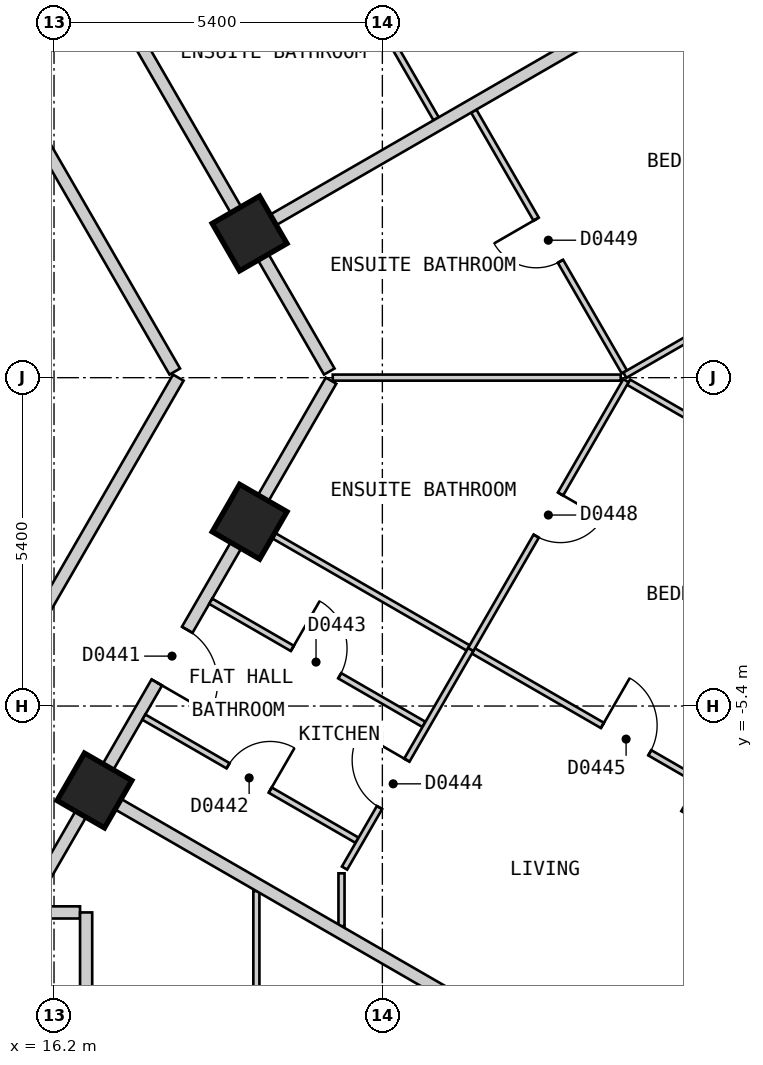
"""IFC4 building model, lengths in metres.
Left out: names, types, materials, properties, quantities, classifications, styles, units other than length and angle.
Written with IfcOpenShell. Run it as: python <this file> out.ifc"""

import sys

from ifc_helpers import new_model, si_unit, direction, frame, frame_2d, origin, origin_2d, place, context, subcontext, project, spatial, polyline, rectangle, outline, extrude, element, fill, save


model = new_model("IFC4")
c1 = context("Model", 3, precision=1e-05, world=origin(), true_north=direction((0.0, 1.0)))
c2 = subcontext(c1, "Body", "Model", "MODEL_VIEW")
j1 = project(units=[si_unit("LENGTHUNIT", "METRE"), si_unit("PLANEANGLEUNIT", "RADIAN")], contexts=[c1])
p1 = place(None, origin())
s1 = spatial("IfcSite", under=j1, at=p1, CompositionType="ELEMENT")
p2 = place(p1, origin())
s2 = spatial("IfcBuilding", under=s1, at=p2, CompositionType="ELEMENT")
p3 = place(p2, frame((0.0, 0.0, 32.4)))
s3 = spatial("IfcBuildingStorey", under=s2, at=p3, CompositionType="ELEMENT", Elevation=32.4)
p4 = place(p3, frame((27.298, -6.919, 0.0), z_axis=(0.0, 0.0, 1.0), x_axis=(0.499984884929, 0.866034130299, 0.0)))
e1 = element("IfcColumn", 1, at=p4, inside=s3, PredefinedType="COLUMN", context=c2, shape_type="SweptSolid", body=[
    extrude(rectangle(XDim=1.1, YDim=1.1, at=origin_2d()), origin(), (0.0, 0.0, 1.0), 3.0),
])
for number, where, z_axis, x_axis in (
    (2, (16.865, -6.789, 0.0), (0.0, 0.0, 1.0), (0.5, 0.866, 0.0)),
    (3, (19.417, -2.369, 0.0), (0.0, 0.0, 1.0), (0.5, 0.866, 0.0)),
    (4, (19.416, 2.371, 0.0), (0.0, 0.0, 1.0), (-0.5, 0.866, 0.0)),
):
    element("IfcColumn", number, at=place(p3, frame(where, z_axis=z_axis, x_axis=x_axis)), inside=s3, PredefinedType="COLUMN", context=c2, shape_type="SweptSolid", body=[
        extrude(rectangle(XDim=0.9, YDim=0.9, at=origin_2d()), origin(), (0.0, 0.0, 1.0), 3.0),
    ])
p5 = place(p3, frame((17.71, -25.825, 0.0), z_axis=(0.0, 0.0, 1.0), x_axis=(0.500001938803, 0.866024284413, 0.0)))
e5 = element("IfcWall", 5, at=p5, inside=s3, PredefinedType="SOLIDWALL", context=c2, shape_type="SweptSolid", body=[
    extrude(outline(polyline([(0.0, -0.15), (27.02, -0.15), (26.94, 0.15), (0.08, 0.15), (0.0, -0.15)])), origin(), (0.0, 0.0, 1.0), 2.7),
])
p6 = place(p5, frame((2.553, 0.0, 0.15)))
e6 = element("IfcOpeningElement", 6, at=p6, cuts=e5, PredefinedType="OPENING", context=c2, shape_type="SweptSolid", body=[
    extrude(rectangle(XDim=1.5, YDim=2.1, at=frame_2d((0.75, 1.05))), frame((0.0, 0.16, 0.0), z_axis=(0.0, -1.0, 0.0), x_axis=(1.0, 0.0, 0.0)), (0.0, 0.0, 1.0), 0.32),
])
p7 = place(p5, frame((7.658, 0.0, 0.15)))
e7 = element("IfcOpeningElement", 7, at=p7, cuts=e5, PredefinedType="OPENING", context=c2, shape_type="SweptSolid", body=[
    extrude(rectangle(XDim=1.5, YDim=2.1, at=frame_2d((0.75, 1.05))), frame((0.0, 0.16, 0.0), z_axis=(0.0, -1.0, 0.0), x_axis=(1.0, 0.0, 0.0)), (0.0, 0.0, 1.0), 0.32),
])
p8 = place(p5, frame((12.761, 0.0, 0.15)))
e8 = element("IfcOpeningElement", 8, at=p8, cuts=e5, PredefinedType="OPENING", context=c2, shape_type="SweptSolid", body=[
    extrude(rectangle(XDim=1.5, YDim=2.1, at=frame_2d((0.75, 1.05))), frame((0.0, 0.16, 0.0), z_axis=(0.0, -1.0, 0.0), x_axis=(1.0, 0.0, 0.0)), (0.0, 0.0, 1.0), 0.32),
])
p9 = place(p5, frame((17.865, 0.0, 0.15)))
e9 = element("IfcOpeningElement", 9, at=p9, cuts=e5, PredefinedType="OPENING", context=c2, shape_type="SweptSolid", body=[
    extrude(rectangle(XDim=1.5, YDim=2.1, at=frame_2d((0.75, 1.05))), frame((0.0, 0.16, 0.0), z_axis=(0.0, -1.0, 0.0), x_axis=(1.0, 0.0, 0.0)), (0.0, 0.0, 1.0), 0.32),
])
p10 = place(p5, frame((22.969, 0.0, 0.15)))
e10 = element("IfcOpeningElement", 10, at=p10, cuts=e5, PredefinedType="OPENING", context=c2, shape_type="SweptSolid", body=[
    extrude(rectangle(XDim=1.5, YDim=2.1, at=frame_2d((0.75, 1.05))), frame((0.0, 0.16, 0.0), z_axis=(0.0, -1.0, 0.0), x_axis=(1.0, 0.0, 0.0)), (0.0, 0.0, 1.0), 0.32),
])
p11 = place(p3, frame((31.22, 2.425, 0.0), z_axis=(0.0, 0.0, 1.0), x_axis=(-0.500001938803, 0.866024284413, 0.0)))
e11 = element("IfcWall", 11, at=p11, inside=s3, PredefinedType="SOLIDWALL", context=c2, shape_type="SweptSolid", body=[
    extrude(outline(polyline([(0.0, -0.15), (27.02, -0.15), (26.94, 0.15), (0.08, 0.15), (0.0, -0.15)])), origin(), (0.0, 0.0, 1.0), 2.7),
])
p12 = place(p11, frame((2.553, 0.0, 0.15)))
e12 = element("IfcOpeningElement", 12, at=p12, cuts=e11, PredefinedType="OPENING", context=c2, shape_type="SweptSolid", body=[
    extrude(rectangle(XDim=1.5, YDim=2.1, at=frame_2d((0.75, 1.05))), frame((0.0, 0.16, 0.0), z_axis=(0.0, -1.0, 0.0), x_axis=(1.0, 0.0, 0.0)), (0.0, 0.0, 1.0), 0.32),
])
p13 = place(p11, frame((7.657, 0.0, 0.15)))
e13 = element("IfcOpeningElement", 13, at=p13, cuts=e11, PredefinedType="OPENING", context=c2, shape_type="SweptSolid", body=[
    extrude(rectangle(XDim=1.5, YDim=2.1, at=frame_2d((0.75, 1.05))), frame((0.0, 0.16, 0.0), z_axis=(0.0, -1.0, 0.0), x_axis=(1.0, 0.0, 0.0)), (0.0, 0.0, 1.0), 0.32),
])
p14 = place(p11, frame((12.761, 0.0, 0.15)))
e14 = element("IfcOpeningElement", 14, at=p14, cuts=e11, PredefinedType="OPENING", context=c2, shape_type="SweptSolid", body=[
    extrude(rectangle(XDim=1.5, YDim=2.1, at=frame_2d((0.75, 1.05))), frame((0.0, 0.16, 0.0), z_axis=(0.0, -1.0, 0.0), x_axis=(1.0, 0.0, 0.0)), (0.0, 0.0, 1.0), 0.32),
])
p15 = place(p11, frame((17.865, 0.0, 0.15)))
e15 = element("IfcOpeningElement", 15, at=p15, cuts=e11, PredefinedType="OPENING", context=c2, shape_type="SweptSolid", body=[
    extrude(rectangle(XDim=1.5, YDim=2.1, at=frame_2d((0.75, 1.05))), frame((0.0, 0.16, 0.0), z_axis=(0.0, -1.0, 0.0), x_axis=(1.0, 0.0, 0.0)), (0.0, 0.0, 1.0), 0.32),
])
p16 = place(p11, frame((22.969, 0.0, 0.15)))
e16 = element("IfcOpeningElement", 16, at=p16, cuts=e11, PredefinedType="OPENING", context=c2, shape_type="SweptSolid", body=[
    extrude(rectangle(XDim=1.5, YDim=2.1, at=frame_2d((0.75, 1.05))), frame((0.0, 0.16, 0.0), z_axis=(0.0, -1.0, 0.0), x_axis=(1.0, 0.0, 0.0)), (0.0, 0.0, 1.0), 0.32),
])
p17 = place(p3, frame((9.18, 15.7, 0.0), z_axis=(0.0, 0.0, 1.0), x_axis=(0.500003652032, -0.866023295272, 0.0)))
e17 = element("IfcWall", 17, at=p17, inside=s3, PredefinedType="PARTITIONING", context=c2, shape_type="SweptSolid", body=[
    extrude(rectangle(XDim=18.012, YDim=0.2, at=frame_2d((9.006, 0.0))), origin(), (0.0, 0.0, 1.0), 2.7),
])
p18 = place(p17, frame((8.556, 0.0, 0.0)))
e18 = element("IfcOpeningElement", 18, at=p18, cuts=e17, PredefinedType="OPENING", context=c2, shape_type="SweptSolid", body=[
    extrude(rectangle(XDim=0.9, YDim=2.1, at=frame_2d((0.45, 1.05))), frame((0.0, 0.11, 0.0), z_axis=(0.0, -1.0, 0.0), x_axis=(1.0, 0.0, 0.0)), (0.0, 0.0, 1.0), 0.22),
])
p19 = place(p3, frame((10.45, 17.9, 0.0), z_axis=(0.0, 0.0, 1.0), x_axis=(0.500034352617, -0.866005569383, 0.0)))
e19 = element("IfcWall", 19, at=p19, inside=s3, PredefinedType="PARTITIONING", context=c2, shape_type="SweptSolid", body=[
    extrude(rectangle(XDim=20.553, YDim=0.2, at=frame_2d((10.276, 0.0))), origin(), (0.0, 0.0, 1.0), 2.7),
])
p20 = place(p19, frame((9.775, 0.0, 0.0)))
e20 = element("IfcOpeningElement", 20, at=p20, cuts=e19, PredefinedType="OPENING", context=c2, shape_type="SweptSolid", body=[
    extrude(rectangle(XDim=1.0, YDim=2.1, at=frame_2d((0.5, 1.05))), frame((0.0, 0.11, 0.0), z_axis=(0.0, -1.0, 0.0), x_axis=(1.0, 0.0, 0.0)), (0.0, 0.0, 1.0), 0.22),
])
p21 = place(p19, frame((0.852, 0.0, 0.0)))
e21 = element("IfcOpeningElement", 21, at=p21, cuts=e19, PredefinedType="OPENING", context=c2, shape_type="SweptSolid", body=[
    extrude(rectangle(XDim=0.8, YDim=2.1, at=frame_2d((0.4, 1.05))), frame((0.0, 0.11, 0.0), z_axis=(0.0, -1.0, 0.0), x_axis=(1.0, 0.0, 0.0)), (0.0, 0.0, 1.0), 0.22),
])
p22 = place(p3, frame((15.822, -8.794, 0.0), z_axis=(0.0, 0.0, 1.0), x_axis=(1.0, 0.0, 0.0)))
e22 = element("IfcWall", 22, at=p22, inside=s3, PredefinedType="PARTITIONING", context=c2, shape_type="SweptSolid", body=[
    extrude(rectangle(XDim=0.806, YDim=0.2, at=frame_2d((0.403, 0.0))), origin(), (0.0, 0.0, 1.0), 2.7),
])
p23 = place(p3, frame((15.6, -4.579, 0.0), z_axis=(0.0, 0.0, 1.0), x_axis=(0.499927597274, 0.866067201483, 0.0)))
e23 = element("IfcWall", 23, at=p23, inside=s3, PredefinedType="PARTITIONING", context=c2, shape_type="SweptSolid", body=[
    extrude(rectangle(XDim=5.288, YDim=0.2, at=frame_2d((2.644, 0.0))), origin(), (0.0, 0.0, 1.0), 2.7),
])
p24 = place(p3, frame((15.707, -8.794, 0.0), z_axis=(0.0, 0.0, 1.0), x_axis=(0.500016151272, 0.866016078642, 0.0)))
e24 = element("IfcWall", 24, at=p24, inside=s3, PredefinedType="PARTITIONING", context=c2, shape_type="SweptSolid", body=[
    extrude(rectangle(XDim=10.098, YDim=0.2, at=frame_2d((5.049, 0.0))), origin(), (0.0, 0.0, 1.0), 2.7),
])
p25 = place(p24, frame((4.367, 0.0, 0.0)))
e25 = element("IfcOpeningElement", 25, at=p25, cuts=e24, PredefinedType="OPENING", context=c2, shape_type="SweptSolid", body=[
    extrude(rectangle(XDim=1.0, YDim=2.1, at=frame_2d((0.5, 1.05))), frame((0.0, 0.11, 0.0), z_axis=(0.0, -1.0, 0.0), x_axis=(1.0, 0.0, 0.0)), (0.0, 0.0, 1.0), 0.22),
])
p26 = place(p3, frame((16.728, -13.624, 0.0), z_axis=(0.0, 0.0, 1.0), x_axis=(0.0, 1.0, 0.0)))
e26 = element("IfcWall", 26, at=p26, inside=s3, PredefinedType="PARTITIONING", context=c2, shape_type="SweptSolid", body=[
    extrude(rectangle(XDim=4.83, YDim=0.2, at=frame_2d((2.415, 0.0))), origin(), (0.0, 0.0, 1.0), 2.7),
])
p27 = place(p3, frame((20.006, 8.548, 0.0), z_axis=(0.0, 0.0, 1.0), x_axis=(0.500055121407, -0.865993577086, 0.0)))
e27 = element("IfcWall", 27, at=p27, inside=s3, PredefinedType="PARTITIONING", context=c2, shape_type="SweptSolid", body=[
    extrude(rectangle(XDim=4.955, YDim=0.1, at=frame_2d((2.478, 0.0))), origin(), (0.0, 0.0, 1.0), 2.7),
])
p28 = place(p27, frame((2.102, 0.0, 0.0)))
e28 = element("IfcOpeningElement", 28, at=p28, cuts=e27, PredefinedType="OPENING", context=c2, shape_type="SweptSolid", body=[
    extrude(rectangle(XDim=0.8, YDim=2.1, at=frame_2d((0.4, 1.05))), frame((0.0, 0.06, 0.0), z_axis=(0.0, -1.0, 0.0), x_axis=(1.0, 0.0, 0.0)), (0.0, 0.0, 1.0), 0.12),
])
p29 = place(p3, frame((23.103, 4.384, 0.0), z_axis=(0.0, 0.0, 1.0), x_axis=(0.500029609304, -0.86600830817, 0.0)))
e29 = element("IfcWall", 29, at=p29, inside=s3, PredefinedType="PARTITIONING", context=c2, shape_type="SweptSolid", body=[
    extrude(rectangle(XDim=4.954, YDim=0.1, at=frame_2d((2.477, 0.0))), origin(), (0.0, 0.0, 1.0), 2.7),
])
p30 = place(p29, frame((2.052, 0.0, 0.0)))
e30 = element("IfcOpeningElement", 30, at=p30, cuts=e29, PredefinedType="OPENING", context=c2, shape_type="SweptSolid", body=[
    extrude(rectangle(XDim=0.8, YDim=2.1, at=frame_2d((0.4, 1.05))), frame((0.0, 0.06, 0.0), z_axis=(0.0, -1.0, 0.0), x_axis=(1.0, 0.0, 0.0)), (0.0, 0.0, 1.0), 0.12),
])
p31 = place(p3, frame((17.677, -5.582, 0.0), z_axis=(0.0, 0.0, 1.0), x_axis=(0.866015917575, -0.500016430238, 0.0)))
e31 = element("IfcWall", 31, at=p31, inside=s3, PredefinedType="PARTITIONING", context=c2, shape_type="SweptSolid", body=[
    extrude(rectangle(XDim=4.05, YDim=0.1, at=frame_2d((2.025, 0.0))), origin(), (0.0, 0.0, 1.0), 2.7),
])
p32 = place(p31, frame((1.6, 0.0, 0.0)))
e32 = element("IfcOpeningElement", 32, at=p32, cuts=e31, PredefinedType="OPENING", context=c2, shape_type="SweptSolid", body=[
    extrude(rectangle(XDim=0.8, YDim=2.1, at=frame_2d((0.4, 1.05))), frame((0.0, 0.06, 0.0), z_axis=(0.0, -1.0, 0.0), x_axis=(1.0, 0.0, 0.0)), (0.0, 0.0, 1.0), 0.12),
])
p33 = place(p3, frame((18.777, -3.677, 0.0), z_axis=(0.0, 0.0, 1.0), x_axis=(0.866000843773, -0.500042536776, 0.0)))
e33 = element("IfcWall", 33, at=p33, inside=s3, PredefinedType="PARTITIONING", context=c2, shape_type="SweptSolid", body=[
    extrude(rectangle(XDim=4.05, YDim=0.1, at=frame_2d((2.025, 0.0))), origin(), (0.0, 0.0, 1.0), 2.7),
])
p34 = place(p33, frame((1.55, 0.0, 0.0)))
e34 = element("IfcOpeningElement", 34, at=p34, cuts=e33, PredefinedType="OPENING", context=c2, shape_type="SweptSolid", body=[
    extrude(rectangle(XDim=0.9, YDim=2.1, at=frame_2d((0.45, 1.05))), frame((0.0, 0.06, 0.0), z_axis=(0.0, -1.0, 0.0), x_axis=(1.0, 0.0, 0.0)), (0.0, 0.0, 1.0), 0.12),
])
p35 = place(p3, frame((19.503, -2.419, 0.0), z_axis=(0.0, 0.0, 1.0), x_axis=(0.866047370643, -0.499961950354, 0.0)))
e35 = element("IfcWall", 35, at=p35, inside=s3, PredefinedType="PARTITIONING", context=c2, shape_type="SweptSolid", body=[
    extrude(rectangle(XDim=10.001, YDim=0.1, at=frame_2d((5.0, 0.0))), origin(), (0.0, 0.0, 1.0), 2.7),
])
p36 = place(p35, frame((6.6, 0.0, 0.0)))
e36 = element("IfcOpeningElement", 36, at=p36, cuts=e35, PredefinedType="OPENING", context=c2, shape_type="SweptSolid", body=[
    extrude(rectangle(XDim=0.9, YDim=2.1, at=frame_2d((0.45, 1.05))), frame((0.0, 0.06, 0.0), z_axis=(0.0, -1.0, 0.0), x_axis=(1.0, 0.0, 0.0)), (0.0, 0.0, 1.0), 0.12),
])
p37 = place(p3, frame((25.649, -0.074, 0.0), z_axis=(0.0, 0.0, 1.0), x_axis=(0.866059819573, -0.499940385368, 0.0)))
e37 = element("IfcWall", 37, at=p37, inside=s3, PredefinedType="PARTITIONING", context=c2, shape_type="SweptSolid", body=[
    extrude(rectangle(XDim=5.851, YDim=0.1, at=frame_2d((2.925, 0.0))), origin(), (0.0, 0.0, 1.0), 2.7),
])
p38 = place(p37, frame((2.45, 0.0, 0.0)))
e38 = element("IfcOpeningElement", 38, at=p38, cuts=e37, PredefinedType="OPENING", context=c2, shape_type="SweptSolid", body=[
    extrude(rectangle(XDim=0.9, YDim=2.1, at=frame_2d((0.45, 1.05))), frame((0.0, 0.06, 0.0), z_axis=(0.0, -1.0, 0.0), x_axis=(1.0, 0.0, 0.0)), (0.0, 0.0, 1.0), 0.12),
])
p39 = place(p3, frame((20.784, 0.001, 0.0), z_axis=(0.0, 0.0, 1.0), x_axis=(1.0, 0.0, 0.0)))
e39 = element("IfcWall", 39, at=p39, inside=s3, PredefinedType="PARTITIONING", context=c2, shape_type="SweptSolid", body=[
    extrude(rectangle(XDim=4.736, YDim=0.1, at=frame_2d((2.368, 0.0))), origin(), (0.0, 0.0, 1.0), 2.7),
])
p40 = place(p3, frame((20.978, -8.065, 0.0), z_axis=(0.0, 0.0, 1.0), x_axis=(0.499965068118, 0.866045570776, 0.0)))
e40 = element("IfcWall", 40, at=p40, inside=s3, PredefinedType="PARTITIONING", context=c2, shape_type="SweptSolid", body=[
    extrude(rectangle(XDim=4.152, YDim=0.1, at=frame_2d((2.076, 0.0))), origin(), (0.0, 0.0, 1.0), 2.7),
])
p41 = place(p40, frame((1.15, 0.0, 0.0)))
e41 = element("IfcOpeningElement", 41, at=p41, cuts=e40, PredefinedType="OPENING", context=c2, shape_type="SweptSolid", body=[
    extrude(rectangle(XDim=0.9, YDim=2.1, at=frame_2d((0.45, 1.05))), frame((0.0, 0.06, 0.0), z_axis=(0.0, -1.0, 0.0), x_axis=(1.0, 0.0, 0.0)), (0.0, 0.0, 1.0), 0.12),
])
p42 = place(p3, frame((19.528, -16.424, 0.0), z_axis=(0.0, 0.0, 1.0), x_axis=(0.0, 1.0, 0.0)))
e42 = element("IfcWall", 42, at=p42, inside=s3, PredefinedType="PARTITIONING", context=c2, shape_type="SweptSolid", body=[
    extrude(rectangle(XDim=7.982, YDim=0.1, at=frame_2d((3.991, 0.0))), origin(), (0.0, 0.0, 1.0), 2.7),
])
p43 = place(p42, frame((4.75, 0.0, 0.0)))
e43 = element("IfcOpeningElement", 43, at=p43, cuts=e42, PredefinedType="OPENING", context=c2, shape_type="SweptSolid", body=[
    extrude(rectangle(XDim=0.8, YDim=2.1, at=frame_2d((0.4, 1.05))), frame((0.0, 0.06, 0.0), z_axis=(0.0, -1.0, 0.0), x_axis=(1.0, 0.0, 0.0)), (0.0, 0.0, 1.0), 0.12),
])
p44 = place(p3, frame((20.928, -9.02, 0.0), z_axis=(0.0, 0.0, 1.0), x_axis=(0.0, 1.0, 0.0)))
e44 = element("IfcWall", 44, at=p44, inside=s3, PredefinedType="PARTITIONING", context=c2, shape_type="SweptSolid", body=[
    extrude(rectangle(XDim=0.869, YDim=0.1, at=frame_2d((0.435, 0.0))), origin(), (0.0, 0.0, 1.0), 2.7),
])
p45 = place(p3, frame((25.588, 0.041, 0.0), z_axis=(0.0, 0.0, 1.0), x_axis=(0.866113484451, 0.499847408768, 0.0)))
e45 = element("IfcWall", 45, at=p45, inside=s3, PredefinedType="PARTITIONING", context=c2, shape_type="SweptSolid", body=[
    extrude(rectangle(XDim=5.92, YDim=0.1, at=frame_2d((2.96, 0.0))), origin(), (0.0, 0.0, 1.0), 2.7),
])
p46 = place(p45, frame((2.51, 0.0, 0.0)))
e46 = element("IfcOpeningElement", 46, at=p46, cuts=e45, PredefinedType="OPENING", context=c2, shape_type="SweptSolid", body=[
    extrude(rectangle(XDim=0.9, YDim=2.1, at=frame_2d((0.45, 1.05))), frame((0.0, 0.06, 0.0), z_axis=(0.0, -1.0, 0.0), x_axis=(1.0, 0.0, 0.0)), (0.0, 0.0, 1.0), 0.12),
])
p47 = place(p3, frame((16.951, -6.839, 0.0), z_axis=(0.0, 0.0, 1.0), x_axis=(0.866022959057, -0.500004234368, 0.0)))
e47 = element("IfcWall", 47, at=p47, inside=s3, PredefinedType="PARTITIONING", context=c2, shape_type="SweptSolid", body=[
    extrude(rectangle(XDim=10.0, YDim=0.2, at=frame_2d((5.0, 0.0))), origin(), (0.0, 0.0, 1.0), 2.7),
])
p48 = place(p3, frame((19.503, 2.421, 0.0), z_axis=(0.0, 0.0, 1.0), x_axis=(0.866065245018, 0.499930986609, 0.0)))
e48 = element("IfcWall", 48, at=p48, inside=s3, PredefinedType="PARTITIONING", context=c2, shape_type="SweptSolid", body=[
    extrude(rectangle(XDim=10.0, YDim=0.2, at=frame_2d((5.0, 0.0))), origin(), (0.0, 0.0, 1.0), 2.7),
])
p49 = place(p3, frame((23.054, -4.469, 0.0), z_axis=(0.0, 0.0, 1.0), x_axis=(0.500023345639, 0.866011924754, 0.0)))
e49 = element("IfcWall", 49, at=p49, inside=s3, PredefinedType="PARTITIONING", context=c2, shape_type="SweptSolid", body=[
    extrude(rectangle(XDim=5.104, YDim=0.1, at=frame_2d((2.552, 0.0))), origin(), (0.0, 0.0, 1.0), 2.7),
])
p50 = place(p49, frame((2.152, 0.0, 0.0)))
e50 = element("IfcOpeningElement", 50, at=p50, cuts=e49, PredefinedType="OPENING", context=c2, shape_type="SweptSolid", body=[
    extrude(rectangle(XDim=0.8, YDim=2.1, at=frame_2d((0.4, 1.05))), frame((0.0, 0.06, 0.0), z_axis=(0.0, -1.0, 0.0), x_axis=(1.0, 0.0, 0.0)), (0.0, 0.0, 1.0), 0.12),
])
p51 = place(p25, origin())
e51 = element("IfcDoor", 51, at=p51, inside=s3, OperationType="SINGLE_SWING_LEFT", PredefinedType="DOOR", context=c2, shape_type="SweptSolid", body=[
    extrude(rectangle(XDim=1.0, YDim=2.1, at=frame_2d((0.5, 1.05))), frame((0.0, 0.025, 0.0), z_axis=(0.0, -1.0, 0.0), x_axis=(1.0, 0.0, 0.0)), (0.0, 0.0, 1.0), 0.05),
])
fill(e25, e51)
p52 = place(p32, origin())
e52 = element("IfcDoor", 52, at=p52, inside=s3, OperationType="SINGLE_SWING_RIGHT", PredefinedType="DOOR", context=c2, shape_type="SweptSolid", body=[
    extrude(rectangle(XDim=0.8, YDim=2.1, at=frame_2d((0.4, 1.05))), frame((0.0, 0.025, 0.0), z_axis=(0.0, -1.0, 0.0), x_axis=(1.0, 0.0, 0.0)), (0.0, 0.0, 1.0), 0.05),
])
fill(e32, e52)
p53 = place(p34, origin())
e53 = element("IfcDoor", 53, at=p53, inside=s3, OperationType="SINGLE_SWING_LEFT", PredefinedType="DOOR", context=c2, shape_type="SweptSolid", body=[
    extrude(rectangle(XDim=0.9, YDim=2.1, at=frame_2d((0.45, 1.05))), frame((0.0, 0.025, 0.0), z_axis=(0.0, -1.0, 0.0), x_axis=(1.0, 0.0, 0.0)), (0.0, 0.0, 1.0), 0.05),
])
fill(e34, e53)
p54 = place(p41, origin())
e54 = element("IfcDoor", 54, at=p54, inside=s3, OperationType="SINGLE_SWING_RIGHT", PredefinedType="DOOR", context=c2, shape_type="SweptSolid", body=[
    extrude(rectangle(XDim=0.9, YDim=2.1, at=frame_2d((0.45, 1.05))), frame((0.0, 0.025, 0.0), z_axis=(0.0, -1.0, 0.0), x_axis=(1.0, 0.0, 0.0)), (0.0, 0.0, 1.0), 0.05),
])
fill(e41, e54)
p55 = place(p36, origin())
e55 = element("IfcDoor", 55, at=p55, inside=s3, OperationType="SINGLE_SWING_LEFT", PredefinedType="DOOR", context=c2, shape_type="SweptSolid", body=[
    extrude(rectangle(XDim=0.9, YDim=2.1, at=frame_2d((0.45, 1.05))), frame((0.0, 0.025, 0.0), z_axis=(0.0, -1.0, 0.0), x_axis=(1.0, 0.0, 0.0)), (0.0, 0.0, 1.0), 0.05),
])
fill(e36, e55)
p56 = place(p50, origin())
e56 = element("IfcDoor", 56, at=p56, inside=s3, OperationType="SINGLE_SWING_RIGHT", PredefinedType="DOOR", context=c2, shape_type="SweptSolid", body=[
    extrude(rectangle(XDim=0.8, YDim=2.1, at=frame_2d((0.4, 1.05))), frame((0.0, 0.025, 0.0), z_axis=(0.0, -1.0, 0.0), x_axis=(1.0, 0.0, 0.0)), (0.0, 0.0, 1.0), 0.05),
])
fill(e50, e56)
p57 = place(p30, origin())
e57 = element("IfcDoor", 57, at=p57, inside=s3, OperationType="SINGLE_SWING_LEFT", PredefinedType="DOOR", context=c2, shape_type="SweptSolid", body=[
    extrude(rectangle(XDim=0.8, YDim=2.1, at=frame_2d((0.4, 1.05))), frame((0.0, 0.025, 0.0), z_axis=(0.0, -1.0, 0.0), x_axis=(1.0, 0.0, 0.0)), (0.0, 0.0, 1.0), 0.05),
])
fill(e30, e57)
save(model, sys.argv[1])
